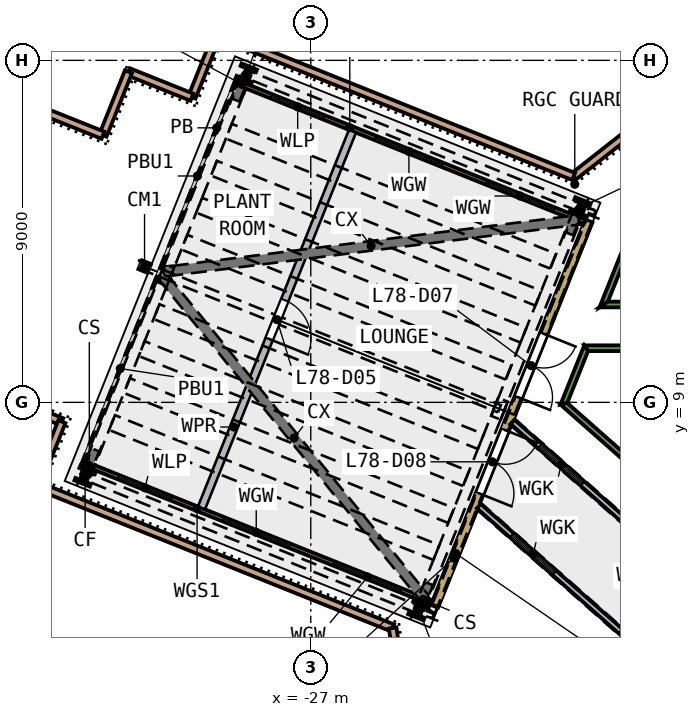
"""IFC4 building model, lengths in metres.
Left out: names, types, materials, properties, quantities, classifications, styles, units other than length and angle.
Written with IfcOpenShell. Run it as: python <this file> out.ifc"""

import sys

from ifc_helpers import new_model, si_unit, direction, frame, frame_2d, origin, origin_2d, place, context, subcontext, project, spatial, polyline, rectangle, i_section, outline, extrude, element, fill, save


model = new_model("IFC4")
c1 = context("Model", 3, precision=1e-05, world=origin(), true_north=direction((0.0, 1.0)))
c2 = subcontext(c1, "Body", "Model", "MODEL_VIEW")
j1 = project(units=[si_unit("LENGTHUNIT", "METRE"), si_unit("PLANEANGLEUNIT", "RADIAN")], contexts=[c1])
p1 = place(None, origin())
s1 = spatial("IfcSite", under=j1, at=p1, CompositionType="ELEMENT")
p2 = place(p1, origin())
s2 = spatial("IfcBuilding", under=s1, at=p2, CompositionType="ELEMENT")
p3 = place(p2, frame((0.0, 0.0, 315.0)))
s3 = spatial("IfcBuildingStorey", under=s2, at=p3, CompositionType="ELEMENT", Elevation=315.0)
for number, where, z_axis, x_axis in (
    (1, (-24.156, 3.541, 0.0), (0.0, 0.0, 1.0), (-0.928, 0.372, 0.0)),
    (2, (-19.915, 14.122, 0.0), (0.0, 0.0, 1.0), (-0.928, 0.372, 0.0)),
    (3, (-32.938, 7.06, 0.0), (0.0, 0.0, 1.0), (-0.928, 0.372, 0.0)),
    (4, (-28.697, 17.642, 0.0), (0.0, 0.0, 1.0), (-0.928, 0.372, 0.0)),
):
    element("IfcColumn", number, at=place(p3, frame(where, z_axis=z_axis, x_axis=x_axis)), inside=s3, PredefinedType="COLUMN", context=c2, shape_type="SweptSolid", body=[
        extrude(i_section(OverallWidth=0.396, OverallDepth=0.381, WebThickness=0.019, FlangeThickness=0.03, FilletRadius=0.015, at=origin_2d()), origin(), (0.0, 0.0, 1.0), 4.5),
    ])
p4 = place(p3, frame((-19.681, 13.77, 0.0), z_axis=(0.0, 0.0, 1.0), x_axis=(-0.372007317, -0.928229797, 0.0)))
e5 = element("IfcWall", 5, at=p4, inside=s3, PredefinedType="SOLIDWALL", context=c2, shape_type="SweptSolid", body=[
    extrude(rectangle(XDim=2.73, YDim=0.2, at=frame_2d((1.365, 0.0))), origin(), (0.0, 0.0, 1.0), 2.456),
])
p5 = place(p3, frame((-19.681, 13.77, 2.71), z_axis=(0.0, 0.0, 1.0), x_axis=(-0.372007317, -0.928229797, 0.0)))
e6 = element("IfcWall", 6, at=p5, inside=s3, PredefinedType="SOLIDWALL", context=c2, shape_type="SweptSolid", body=[
    extrude(rectangle(XDim=2.73, YDim=0.2, at=frame_2d((1.365, 0.0))), origin(), (0.0, 0.0, 1.0), 1.09),
])
p6 = place(p3, frame((-20.697, 11.236, 0.0), z_axis=(0.0, 0.0, 1.0), x_axis=(-0.372038199, -0.92821742, 0.0)))
e7 = element("IfcWall", 7, at=p6, inside=s3, PredefinedType="SOLIDWALL", context=c2, shape_type="SweptSolid", body=[
    extrude(rectangle(XDim=2.73, YDim=0.2, at=frame_2d((1.365, 0.0))), origin(), (0.0, 0.0, 1.0), 2.456),
])
p7 = place(p6, frame((0.465, 0.0, 0.0)))
e8 = element("IfcOpeningElement", 8, at=p7, cuts=e7, PredefinedType="OPENING", context=c2, shape_type="SweptSolid", body=[
    extrude(rectangle(XDim=1.8, YDim=2.1, at=frame_2d((0.9, 1.05))), frame((0.0, 0.11, 0.0), z_axis=(0.0, -1.0, 0.0), x_axis=(1.0, 0.0, 0.0)), (0.0, 0.0, 1.0), 0.22),
])
p8 = place(p3, frame((-20.697, 11.236, 2.71), z_axis=(0.0, 0.0, 1.0), x_axis=(-0.372038199, -0.92821742, 0.0)))
e9 = element("IfcWall", 9, at=p8, inside=s3, PredefinedType="SOLIDWALL", context=c2, shape_type="SweptSolid", body=[
    extrude(rectangle(XDim=2.73, YDim=0.2, at=frame_2d((1.365, 0.0))), origin(), (0.0, 0.0, 1.0), 1.09),
])
p9 = place(p3, frame((-21.712, 8.702, 0.0), z_axis=(0.0, 0.0, 1.0), x_axis=(-0.372007317, -0.928229797, 0.0)))
e10 = element("IfcWall", 10, at=p9, inside=s3, PredefinedType="SOLIDWALL", context=c2, shape_type="SweptSolid", body=[
    extrude(rectangle(XDim=2.73, YDim=0.2, at=frame_2d((1.365, 0.0))), origin(), (0.0, 0.0, 1.0), 2.456),
])
p10 = place(p9, frame((0.465, 0.0, 0.0)))
e11 = element("IfcOpeningElement", 11, at=p10, cuts=e10, PredefinedType="OPENING", context=c2, shape_type="SweptSolid", body=[
    extrude(rectangle(XDim=1.8, YDim=2.1, at=frame_2d((0.9, 1.05))), frame((0.0, 0.11, 0.0), z_axis=(0.0, -1.0, 0.0), x_axis=(1.0, 0.0, 0.0)), (0.0, 0.0, 1.0), 0.22),
])
p11 = place(p3, frame((-21.712, 8.702, 2.71), z_axis=(0.0, 0.0, 1.0), x_axis=(-0.372007317, -0.928229797, 0.0)))
e12 = element("IfcWall", 12, at=p11, inside=s3, PredefinedType="SOLIDWALL", context=c2, shape_type="SweptSolid", body=[
    extrude(rectangle(XDim=2.73, YDim=0.2, at=frame_2d((1.365, 0.0))), origin(), (0.0, 0.0, 1.0), 1.09),
])
p12 = place(p3, frame((-22.728, 6.168, 0.0), z_axis=(0.0, 0.0, 1.0), x_axis=(-0.372038199, -0.92821742, 0.0)))
e13 = element("IfcWall", 13, at=p12, inside=s3, PredefinedType="SOLIDWALL", context=c2, shape_type="SweptSolid", body=[
    extrude(rectangle(XDim=2.73, YDim=0.2, at=frame_2d((1.365, 0.0))), origin(), (0.0, 0.0, 1.0), 2.456),
])
p13 = place(p3, frame((-22.728, 6.168, 2.71), z_axis=(0.0, 0.0, 1.0), x_axis=(-0.372038199, -0.92821742, 0.0)))
e14 = element("IfcWall", 14, at=p13, inside=s3, PredefinedType="SOLIDWALL", context=c2, shape_type="SweptSolid", body=[
    extrude(rectangle(XDim=2.73, YDim=0.2, at=frame_2d((1.365, 0.0))), origin(), (0.0, 0.0, 1.0), 1.09),
])
for number, where, z_axis, x_axis in (
    (15, (-19.681, 13.77, 3.8), (0.0, 0.0, 1.0), (-0.372, -0.928, 0.0)),
    (16, (-23.743, 3.634, 3.8), (0.0, 0.0, 1.0), (0.372, 0.928, 0.0)),
):
    element("IfcWall", number, at=place(p3, frame(where, z_axis=z_axis, x_axis=x_axis)), inside=s3, PredefinedType="SOLIDWALL", context=c2, shape_type="SweptSolid", body=[
        extrude(outline(polyline([(0.0, 0.0), (5.46, 0.0), (5.46, 16.584), (0.0, 1.603), (0.0, 0.0)])), frame((0.0, 0.1, 0.0), z_axis=(0.0, -1.0, 0.0), x_axis=(1.0, 0.0, 0.0)), (0.0, 0.0, 1.0), 0.2),
    ])
p14 = place(p3, frame((-23.814, 3.727, 0.0), z_axis=(0.0, 0.0, 1.0), x_axis=(-0.928217226, 0.372038683, 0.0)))
e17 = element("IfcWall", 17, at=p14, inside=s3, PredefinedType="SOLIDWALL", context=c2, shape_type="SweptSolid", body=[
    extrude(outline(polyline([(0.0, 0.0), (9.872, 0.0), (9.872, 5.403), (9.85, 5.403), (9.849, 3.192), (9.57, 3.192), (9.569, 5.403), (0.389, 5.403), (0.388, 3.192), (0.109, 3.192), (0.108, 5.403), (0.0, 5.403), (0.0, 0.0)])), frame((0.0, 0.06, 0.0), z_axis=(0.0, -1.0, 0.0), x_axis=(1.0, 0.0, 0.0)), (0.0, 0.0, 1.0), 0.12),
])
p15 = place(p14, frame((0.875, 0.0, 0.9)))
e18 = element("IfcOpeningElement", 18, at=p15, cuts=e17, PredefinedType="OPENING", context=c2, shape_type="SweptSolid", body=[
    extrude(rectangle(XDim=1.9, YDim=2.2, at=frame_2d((0.95, 1.1))), frame((0.0, 0.07, 0.0), z_axis=(0.0, -1.0, 0.0), x_axis=(1.0, 0.0, 0.0)), (0.0, 0.0, 1.0), 0.14),
])
p16 = place(p14, frame((4.029, 0.0, 0.9)))
e19 = element("IfcOpeningElement", 19, at=p16, cuts=e17, PredefinedType="OPENING", context=c2, shape_type="SweptSolid", body=[
    extrude(rectangle(XDim=1.9, YDim=2.2, at=frame_2d((0.95, 1.1))), frame((0.0, 0.07, 0.0), z_axis=(0.0, -1.0, 0.0), x_axis=(1.0, 0.0, 0.0)), (0.0, 0.0, 1.0), 0.14),
])
p17 = place(p14, frame((7.382, 0.0, 0.9)))
e20 = element("IfcOpeningElement", 20, at=p17, cuts=e17, PredefinedType="OPENING", context=c2, shape_type="SweptSolid", body=[
    extrude(rectangle(XDim=1.5, YDim=1.8, at=frame_2d((0.75, 0.9))), frame((0.0, 0.07, 0.0), z_axis=(0.0, -1.0, 0.0), x_axis=(1.0, 0.0, 0.0)), (0.0, 0.0, 1.0), 0.14),
])
p18 = place(p3, frame((-19.796, 13.751, 0.0), z_axis=(0.0, 0.0, 1.0), x_axis=(-0.928229188, 0.372008836, 0.0)))
e21 = element("IfcWall", 21, at=p18, inside=s3, PredefinedType="SOLIDWALL", context=c2, shape_type="SweptSolid", body=[
    extrude(outline(polyline([(0.0, 0.0), (9.872, 0.0), (9.872, 5.403), (9.85, 5.403), (9.849, 3.192), (9.57, 3.192), (9.569, 5.403), (0.389, 5.403), (0.388, 3.192), (0.109, 3.192), (0.108, 5.403), (0.0, 5.403), (0.0, 0.0)])), frame((0.0, 0.06, 0.0), z_axis=(0.0, -1.0, 0.0), x_axis=(1.0, 0.0, 0.0)), (0.0, 0.0, 1.0), 0.12),
])
p19 = place(p18, frame((0.875, 0.0, 0.9)))
e22 = element("IfcOpeningElement", 22, at=p19, cuts=e21, PredefinedType="OPENING", context=c2, shape_type="SweptSolid", body=[
    extrude(rectangle(XDim=1.9, YDim=2.2, at=frame_2d((0.95, 1.1))), frame((0.0, 0.07, 0.0), z_axis=(0.0, -1.0, 0.0), x_axis=(1.0, 0.0, 0.0)), (0.0, 0.0, 1.0), 0.14),
])
p20 = place(p18, frame((4.029, 0.0, 0.9)))
e23 = element("IfcOpeningElement", 23, at=p20, cuts=e21, PredefinedType="OPENING", context=c2, shape_type="SweptSolid", body=[
    extrude(rectangle(XDim=1.9, YDim=2.2, at=frame_2d((0.95, 1.1))), frame((0.0, 0.07, 0.0), z_axis=(0.0, -1.0, 0.0), x_axis=(1.0, 0.0, 0.0)), (0.0, 0.0, 1.0), 0.14),
])
p21 = place(p18, frame((7.382, 0.0, 0.9)))
e24 = element("IfcOpeningElement", 24, at=p21, cuts=e21, PredefinedType="OPENING", context=c2, shape_type="SweptSolid", body=[
    extrude(rectangle(XDim=1.5, YDim=1.8, at=frame_2d((0.75, 0.9))), frame((0.0, 0.07, 0.0), z_axis=(0.0, -1.0, 0.0), x_axis=(1.0, 0.0, 0.0)), (0.0, 0.0, 1.0), 0.14),
])
p22 = place(p3, frame((-25.903, 16.135, 0.0), z_axis=(0.0, 0.0, 1.0), x_axis=(-0.372013313, -0.928227394, 0.0)))
e25 = element("IfcWall", 25, at=p22, inside=s3, PredefinedType="SOLIDWALL", context=c2, shape_type="SweptSolid", body=[
    extrude(outline(polyline([(0.0, 0.0), (10.68, 0.0), (10.68, 3.981), (0.0, 3.6), (0.0, 0.0)])), frame((0.0, 0.1, 0.0), z_axis=(0.0, -1.0, 0.0), x_axis=(1.0, 0.0, 0.0)), (0.0, 0.0, 1.0), 0.2),
])
p23 = place(p22, frame((4.79, 0.0, 0.0)))
e26 = element("IfcOpeningElement", 26, at=p23, cuts=e25, PredefinedType="OPENING", context=c2, shape_type="SweptSolid", body=[
    extrude(rectangle(XDim=1.1, YDim=2.1, at=frame_2d((0.55, 1.05))), frame((0.0, 0.11, 0.0), z_axis=(0.0, -1.0, 0.0), x_axis=(1.0, 0.0, 0.0)), (0.0, 0.0, 1.0), 0.22),
])
p24 = place(p3, frame((-9.837, 22.995, 0.0), z_axis=(0.0, 0.0, 1.0), x_axis=(-0.786289732, -0.617857958, 0.0)))
e27 = element("IfcWall", 27, at=p24, inside=s3, PredefinedType="SOLIDWALL", context=c2, shape_type="SweptSolid", body=[
    extrude(rectangle(XDim=13.031, YDim=0.2, at=frame_2d((6.516, 0.0))), origin(), (0.0, 0.0, 1.0), 0.45),
])
p25 = place(p3, frame((-20.083, 14.944, 0.0), z_axis=(0.0, 0.0, 1.0), x_axis=(-0.928228076, 0.372011612, 0.0)))
e28 = element("IfcWall", 28, at=p25, inside=s3, PredefinedType="SOLIDWALL", context=c2, shape_type="SweptSolid", body=[
    extrude(rectangle(XDim=10.099, YDim=0.2, at=frame_2d((5.05, 0.0))), origin(), (0.0, 0.0, 1.0), 0.45),
])
for number, where, z_axis, x_axis in (
    (29, (-29.457, 18.701, 0.0), (0.0, 0.0, 1.0), (-0.372, -0.928, 0.0)),
    (30, (-30.127, 17.03, 0.0), (0.0, 0.0, 1.0), (-0.928, 0.372, 0.0)),
):
    element("IfcWall", number, at=place(p3, frame(where, z_axis=z_axis, x_axis=x_axis)), inside=s3, PredefinedType="SOLIDWALL", context=c2, shape_type="SweptSolid", body=[
        extrude(rectangle(XDim=1.8, YDim=0.2, at=frame_2d((0.9, 0.0))), origin(), (0.0, 0.0, 1.0), 0.45),
    ])
for number, where, z_axis, x_axis in (
    (31, (-31.798, 17.7, 0.0), (0.0, 0.0, 1.0), (-0.372, -0.928, 0.0)),
    (32, (-32.467, 16.029, 0.0), (0.0, 0.0, 1.0), (-0.928, 0.372, 0.0)),
    (33, (-35.22, 9.16, 0.0), (0.0, 0.0, 1.0), (0.928, -0.372, 0.0)),
):
    element("IfcWall", number, at=place(p3, frame(where, z_axis=z_axis, x_axis=x_axis)), inside=s3, PredefinedType="SOLIDWALL", context=c2, shape_type="SweptSolid", body=[
        extrude(rectangle(XDim=1.8, YDim=0.2, at=frame_2d((0.9, 0.0))), origin(), (0.0, 0.0, 1.0), 0.45),
    ])
p26 = place(p3, frame((-33.549, 8.49, 0.0), z_axis=(0.0, 0.0, 1.0), x_axis=(-0.372068792, -0.928205157, 0.0)))
e34 = element("IfcWall", 34, at=p26, inside=s3, PredefinedType="SOLIDWALL", context=c2, shape_type="SweptSolid", body=[
    extrude(rectangle(XDim=1.8, YDim=0.2, at=frame_2d((0.9, 0.0))), origin(), (0.0, 0.0, 1.0), 0.45),
])
p27 = place(p3, frame((-34.219, 6.82, 0.0), z_axis=(0.0, 0.0, 1.0), x_axis=(0.928228076, -0.372011612, 0.0)))
e35 = element("IfcWall", 35, at=p27, inside=s3, PredefinedType="SOLIDWALL", context=c2, shape_type="SweptSolid", body=[
    extrude(rectangle(XDim=10.099, YDim=0.2, at=frame_2d((5.05, 0.0))), origin(), (0.0, 0.0, 1.0), 0.45),
])
p28 = place(p3, frame((-24.844, 3.062, 0.0), z_axis=(0.0, 0.0, 1.0), x_axis=(0.141938054, -0.989875542, 0.0)))
e36 = element("IfcWall", 36, at=p28, inside=s3, PredefinedType="SOLIDWALL", context=c2, shape_type="SweptSolid", body=[
    extrude(rectangle(XDim=13.031, YDim=0.2, at=frame_2d((6.516, 0.0))), origin(), (0.0, 0.0, 1.0), 0.45),
])
p29 = place(p3, origin())
e37 = element("IfcWall", 37, at=p29, inside=s3, PredefinedType="SOLIDWALL", context=c2, shape_type="SweptSolid", body=[
    extrude(outline(polyline([(-12.127, 10.5), (-19.804, 10.5), (-19.703, 10.35), (-12.49, 10.35), (-12.127, 10.5)])), origin(), (0.0, 0.0, 1.0), 0.6),
])
p30 = place(p3, origin())
e38 = element("IfcWall", 38, at=p30, inside=s3, PredefinedType="SOLIDWALL", context=c2, shape_type="SweptSolid", body=[
    extrude(outline(polyline([(-19.804, 10.5), (-20.429, 8.941), (-20.251, 8.983), (-19.703, 10.35), (-19.804, 10.5)])), origin(), (0.0, 0.0, 1.0), 0.6),
])
p31 = place(p3, origin())
e39 = element("IfcWall", 39, at=p31, inside=s3, PredefinedType="SOLIDWALL", context=c2, shape_type="SweptSolid", body=[
    extrude(outline(polyline([(-20.429, 8.941), (-16.0, 5.031), (-16.15, 5.364), (-20.251, 8.983), (-20.429, 8.941)])), origin(), (0.0, 0.0, 1.0), 0.6),
])
p32 = place(p3, origin())
e40 = element("IfcWall", 40, at=p32, inside=s3, PredefinedType="SOLIDWALL", context=c2, shape_type="SweptSolid", body=[
    extrude(outline(polyline([(-18.49, 13.778), (-19.404, 11.5), (-19.182, 11.65), (-18.366, 13.685), (-18.49, 13.778)])), origin(), (0.0, 0.0, 1.0), 0.6),
])
p33 = place(p3, origin())
e41 = element("IfcWall", 41, at=p33, inside=s3, PredefinedType="SOLIDWALL", context=c2, shape_type="SweptSolid", body=[
    extrude(outline(polyline([(-19.404, 11.5), (-11.5, 11.5), (-11.65, 11.65), (-19.182, 11.65), (-19.404, 11.5)])), origin(), (0.0, 0.0, 1.0), 0.6),
])
p34 = place(p3, frame((-14.0, -1.302, 0.0), z_axis=(0.0, 0.0, 1.0), x_axis=(-0.749741338, 0.661731007, 0.0)))
e42 = element("IfcWall", 42, at=p34, inside=s3, PredefinedType="SOLIDWALL", context=c2, shape_type="SweptSolid", body=[
    extrude(rectangle(XDim=11.443, YDim=0.15, at=frame_2d((5.721, 0.0))), origin(), (0.0, 0.0, 1.0), 2.46),
])
p35 = place(p34, frame((1.157, 0.0, 0.9)))
e43 = element("IfcOpeningElement", 43, at=p35, cuts=e42, PredefinedType="OPENING", context=c2, shape_type="SweptSolid", body=[
    extrude(rectangle(XDim=1.5, YDim=1.3, at=frame_2d((0.75, 0.65))), frame((0.0, 0.085, 0.0), z_axis=(0.0, -1.0, 0.0), x_axis=(1.0, 0.0, 0.0)), (0.0, 0.0, 1.0), 0.17),
])
p36 = place(p34, frame((4.971, 0.0, 0.9)))
e44 = element("IfcOpeningElement", 44, at=p36, cuts=e42, PredefinedType="OPENING", context=c2, shape_type="SweptSolid", body=[
    extrude(rectangle(XDim=1.5, YDim=1.3, at=frame_2d((0.75, 0.65))), frame((0.0, 0.085, 0.0), z_axis=(0.0, -1.0, 0.0), x_axis=(1.0, 0.0, 0.0)), (0.0, 0.0, 1.0), 0.17),
])
p37 = place(p34, frame((8.786, 0.0, 0.9)))
e45 = element("IfcOpeningElement", 45, at=p37, cuts=e42, PredefinedType="OPENING", context=c2, shape_type="SweptSolid", body=[
    extrude(rectangle(XDim=1.5, YDim=1.3, at=frame_2d((0.75, 0.65))), frame((0.0, 0.085, 0.0), z_axis=(0.0, -1.0, 0.0), x_axis=(1.0, 0.0, 0.0)), (0.0, 0.0, 1.0), 0.17),
])
p38 = place(p3, frame((-14.0, 1.699, 0.0), z_axis=(0.0, 0.0, 1.0), x_axis=(-0.749755194, 0.661715308, 0.0)))
e46 = element("IfcWall", 46, at=p38, inside=s3, PredefinedType="SOLIDWALL", context=c2, shape_type="SweptSolid", body=[
    extrude(rectangle(XDim=10.258, YDim=0.15, at=frame_2d((5.129, 0.0))), origin(), (0.0, 0.0, 1.0), 2.46),
])
p39 = place(p38, frame((0.96, 0.0, 0.9)))
e47 = element("IfcOpeningElement", 47, at=p39, cuts=e46, PredefinedType="OPENING", context=c2, shape_type="SweptSolid", body=[
    extrude(rectangle(XDim=1.5, YDim=1.3, at=frame_2d((0.75, 0.65))), frame((0.0, 0.085, 0.0), z_axis=(0.0, -1.0, 0.0), x_axis=(1.0, 0.0, 0.0)), (0.0, 0.0, 1.0), 0.17),
])
p40 = place(p38, frame((4.379, 0.0, 0.9)))
e48 = element("IfcOpeningElement", 48, at=p40, cuts=e46, PredefinedType="OPENING", context=c2, shape_type="SweptSolid", body=[
    extrude(rectangle(XDim=1.5, YDim=1.3, at=frame_2d((0.75, 0.65))), frame((0.0, 0.085, 0.0), z_axis=(0.0, -1.0, 0.0), x_axis=(1.0, 0.0, 0.0)), (0.0, 0.0, 1.0), 0.17),
])
p41 = place(p38, frame((7.798, 0.0, 0.9)))
e49 = element("IfcOpeningElement", 49, at=p41, cuts=e46, PredefinedType="OPENING", context=c2, shape_type="SweptSolid", body=[
    extrude(rectangle(XDim=1.5, YDim=1.3, at=frame_2d((0.75, 0.65))), frame((0.0, 0.085, 0.0), z_axis=(0.0, -1.0, 0.0), x_axis=(1.0, 0.0, 0.0)), (0.0, 0.0, 1.0), 0.17),
])
p42 = place(p7, origin())
e50 = element("IfcDoor", 50, at=p42, inside=s3, OperationType="DOUBLE_DOOR_SINGLE_SWING", PredefinedType="DOOR", context=c2, shape_type="SweptSolid", body=[
    extrude(rectangle(XDim=1.8, YDim=2.1, at=frame_2d((0.9, 1.05))), frame((0.0, 0.025, 0.0), z_axis=(0.0, -1.0, 0.0), x_axis=(1.0, 0.0, 0.0)), (0.0, 0.0, 1.0), 0.05),
])
fill(e8, e50)
p43 = place(p10, origin())
e51 = element("IfcDoor", 51, at=p43, inside=s3, OperationType="DOUBLE_DOOR_SINGLE_SWING", PredefinedType="DOOR", context=c2, shape_type="SweptSolid", body=[
    extrude(rectangle(XDim=1.8, YDim=2.1, at=frame_2d((0.9, 1.05))), frame((0.0, 0.025, 0.0), z_axis=(0.0, -1.0, 0.0), x_axis=(1.0, 0.0, 0.0)), (0.0, 0.0, 1.0), 0.05),
])
fill(e11, e51)
p44 = place(p15, origin())
e52 = element("IfcWindow", 52, at=p44, inside=s3, PartitioningType="DOUBLE_PANEL_HORIZONTAL", PredefinedType="WINDOW", context=c2, shape_type="SweptSolid", body=[
    extrude(rectangle(XDim=1.9, YDim=2.2, at=frame_2d((0.95, 1.1))), frame((0.0, 0.03, 0.0), z_axis=(0.0, -1.0, 0.0), x_axis=(1.0, 0.0, 0.0)), (0.0, 0.0, 1.0), 0.06),
])
fill(e18, e52)
p45 = place(p16, origin())
e53 = element("IfcWindow", 53, at=p45, inside=s3, PartitioningType="DOUBLE_PANEL_HORIZONTAL", PredefinedType="WINDOW", context=c2, shape_type="SweptSolid", body=[
    extrude(rectangle(XDim=1.9, YDim=2.2, at=frame_2d((0.95, 1.1))), frame((0.0, 0.03, 0.0), z_axis=(0.0, -1.0, 0.0), x_axis=(1.0, 0.0, 0.0)), (0.0, 0.0, 1.0), 0.06),
])
fill(e19, e53)
p46 = place(p17, origin())
e54 = element("IfcWindow", 54, at=p46, inside=s3, PartitioningType="SINGLE_PANEL", PredefinedType="WINDOW", context=c2, shape_type="SweptSolid", body=[
    extrude(rectangle(XDim=1.5, YDim=1.8, at=frame_2d((0.75, 0.9))), frame((0.0, 0.03, 0.0), z_axis=(0.0, -1.0, 0.0), x_axis=(1.0, 0.0, 0.0)), (0.0, 0.0, 1.0), 0.06),
])
fill(e20, e54)
p47 = place(p19, origin())
e55 = element("IfcWindow", 55, at=p47, inside=s3, PartitioningType="DOUBLE_PANEL_HORIZONTAL", PredefinedType="WINDOW", context=c2, shape_type="SweptSolid", body=[
    extrude(rectangle(XDim=1.9, YDim=2.2, at=frame_2d((0.95, 1.1))), frame((0.0, 0.03, 0.0), z_axis=(0.0, -1.0, 0.0), x_axis=(1.0, 0.0, 0.0)), (0.0, 0.0, 1.0), 0.06),
])
fill(e22, e55)
p48 = place(p20, origin())
e56 = element("IfcWindow", 56, at=p48, inside=s3, PartitioningType="DOUBLE_PANEL_HORIZONTAL", PredefinedType="WINDOW", context=c2, shape_type="SweptSolid", body=[
    extrude(rectangle(XDim=1.9, YDim=2.2, at=frame_2d((0.95, 1.1))), frame((0.0, 0.03, 0.0), z_axis=(0.0, -1.0, 0.0), x_axis=(1.0, 0.0, 0.0)), (0.0, 0.0, 1.0), 0.06),
])
fill(e23, e56)
p49 = place(p21, origin())
e57 = element("IfcWindow", 57, at=p49, inside=s3, PartitioningType="SINGLE_PANEL", PredefinedType="WINDOW", context=c2, shape_type="SweptSolid", body=[
    extrude(rectangle(XDim=1.5, YDim=1.8, at=frame_2d((0.75, 0.9))), frame((0.0, 0.03, 0.0), z_axis=(0.0, -1.0, 0.0), x_axis=(1.0, 0.0, 0.0)), (0.0, 0.0, 1.0), 0.06),
])
fill(e24, e57)
p50 = place(p23, origin())
e58 = element("IfcDoor", 58, at=p50, inside=s3, OperationType="SINGLE_SWING_RIGHT", PredefinedType="DOOR", context=c2, shape_type="SweptSolid", body=[
    extrude(rectangle(XDim=1.1, YDim=2.1, at=frame_2d((0.55, 1.05))), frame((0.0, 0.025, 0.0), z_axis=(0.0, -1.0, 0.0), x_axis=(1.0, 0.0, 0.0)), (0.0, 0.0, 1.0), 0.05),
])
fill(e26, e58)
p51 = place(p36, origin())
e59 = element("IfcWindow", 59, at=p51, inside=s3, PartitioningType="SINGLE_PANEL", PredefinedType="WINDOW", context=c2, shape_type="SweptSolid", body=[
    extrude(rectangle(XDim=1.5, YDim=1.3, at=frame_2d((0.75, 0.65))), frame((0.0, 0.03, 0.0), z_axis=(0.0, -1.0, 0.0), x_axis=(1.0, 0.0, 0.0)), (0.0, 0.0, 1.0), 0.06),
])
fill(e44, e59)
p52 = place(p37, origin())
e60 = element("IfcWindow", 60, at=p52, inside=s3, PartitioningType="SINGLE_PANEL", PredefinedType="WINDOW", context=c2, shape_type="SweptSolid", body=[
    extrude(rectangle(XDim=1.5, YDim=1.3, at=frame_2d((0.75, 0.65))), frame((0.0, 0.03, 0.0), z_axis=(0.0, -1.0, 0.0), x_axis=(1.0, 0.0, 0.0)), (0.0, 0.0, 1.0), 0.06),
])
fill(e45, e60)
p53 = place(p41, origin())
e61 = element("IfcWindow", 61, at=p53, inside=s3, PartitioningType="SINGLE_PANEL", PredefinedType="WINDOW", context=c2, shape_type="SweptSolid", body=[
    extrude(rectangle(XDim=1.5, YDim=1.3, at=frame_2d((0.75, 0.65))), frame((0.0, 0.03, 0.0), z_axis=(0.0, -1.0, 0.0), x_axis=(1.0, 0.0, 0.0)), (0.0, 0.0, 1.0), 0.06),
])
fill(e49, e61)
save(model, sys.argv[1])
